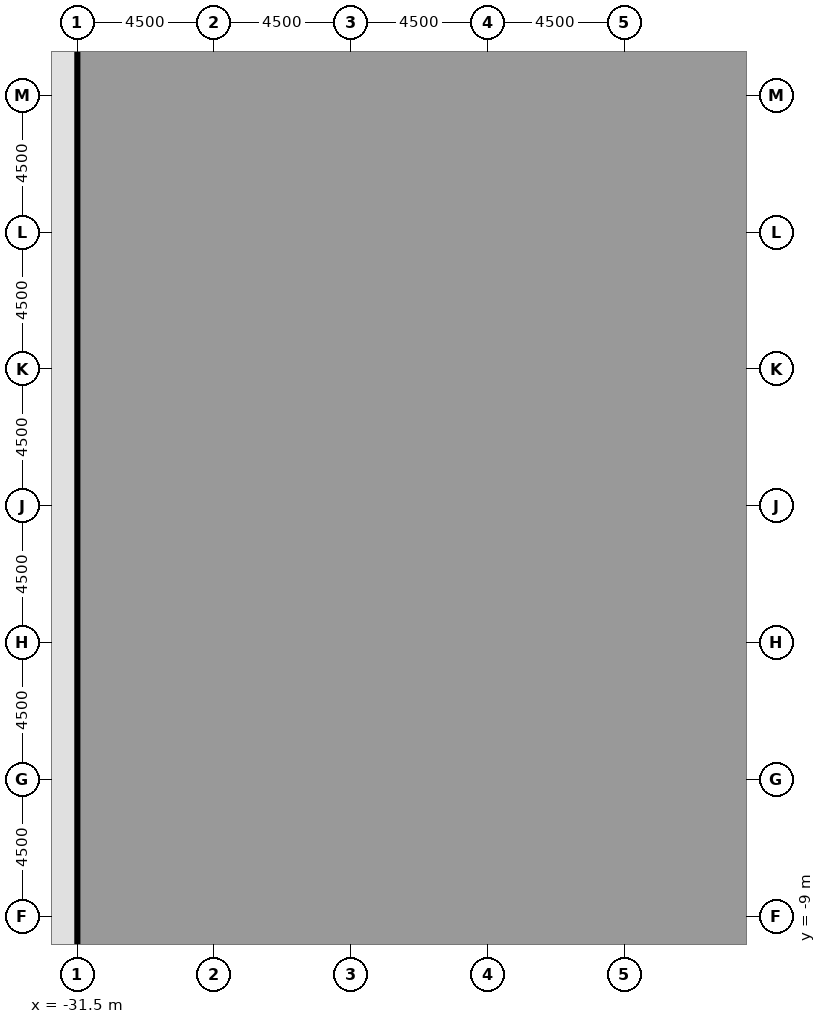
"""IFC4 building model, lengths in metres.
Left out: names, types, materials, properties, quantities, classifications, styles, units other than length and angle.
Written with IfcOpenShell. Run it as: python <this file> out.ifc"""

import sys

from ifc_helpers import new_model, si_unit, direction, frame, frame_2d, origin, origin_2d, place, context, subcontext, project, spatial, rectangle, extrude, element, fill, save


model = new_model("IFC4")
c1 = context("Model", 3, precision=1e-05, world=origin(), true_north=direction((0.0, 1.0)))
c2 = subcontext(c1, "Body", "Model", "MODEL_VIEW")
j1 = project(units=[si_unit("LENGTHUNIT", "METRE"), si_unit("PLANEANGLEUNIT", "RADIAN")], contexts=[c1])
p1 = place(None, origin())
s1 = spatial("IfcSite", under=j1, at=p1, CompositionType="ELEMENT")
p2 = place(p1, origin())
s2 = spatial("IfcBuilding", under=s1, at=p2, CompositionType="ELEMENT")
p3 = place(p2, origin())
s3 = spatial("IfcBuildingStorey", under=s2, at=p3, CompositionType="ELEMENT", Elevation=0.0)
for number, where, z_axis, x_axis in (
    (1, (-31.5, -9.0, 0.0), (0.0, 0.0, 1.0), (1.0, 0.0, 0.0)),
    (2, (-31.5, -4.5, 0.0), (0.0, 0.0, 1.0), (1.0, 0.0, 0.0)),
    (3, (-31.5, 0.0, 0.0), (0.0, 0.0, 1.0), (1.0, 0.0, 0.0)),
    (4, (-31.5, 4.5, 0.0), (0.0, 0.0, 1.0), (1.0, 0.0, 0.0)),
    (5, (-31.5, 9.0, 0.0), (0.0, 0.0, 1.0), (1.0, 0.0, 0.0)),
    (6, (-31.5, 13.5, 0.0), (0.0, 0.0, 1.0), (1.0, 0.0, 0.0)),
    (7, (-31.5, 18.0, 0.0), (0.0, 0.0, 1.0), (1.0, 0.0, 0.0)),
):
    element("IfcColumn", number, at=place(p3, frame(where, z_axis=z_axis, x_axis=x_axis)), inside=s3, PredefinedType="COLUMN", context=c2, shape_type="SweptSolid", body=[
        extrude(rectangle(XDim=1.4, YDim=1.4, at=origin_2d()), origin(), (0.0, 0.0, 1.0), 7.2),
    ])
for number, where, z_axis, x_axis in (
    (8, (-27.0, -9.0, 0.0), (0.0, 0.0, 1.0), (1.0, 0.0, 0.0)),
    (9, (-27.0, 0.0, 0.0), (0.0, 0.0, 1.0), (1.0, 0.0, 0.0)),
    (10, (-27.0, 9.0, 0.0), (0.0, 0.0, 1.0), (1.0, 0.0, 0.0)),
    (11, (-27.0, 18.0, 0.0), (0.0, 0.0, 1.0), (1.0, 0.0, 0.0)),
):
    element("IfcColumn", number, at=place(p3, frame(where, z_axis=z_axis, x_axis=x_axis)), inside=s3, PredefinedType="COLUMN", context=c2, shape_type="SweptSolid", body=[
        extrude(rectangle(XDim=1.6, YDim=1.6, at=origin_2d()), origin(), (0.0, 0.0, 1.0), 6.75),
    ])
for number, where, z_axis, x_axis in (
    (12, (-18.0, -9.0, 0.0), (0.0, 0.0, 1.0), (1.0, 0.0, 0.0)),
    (13, (-18.0, 0.0, 0.0), (0.0, 0.0, 1.0), (1.0, 0.0, 0.0)),
    (14, (-18.0, 9.0, 0.0), (0.0, 0.0, 1.0), (1.0, 0.0, 0.0)),
    (15, (-18.0, 18.0, 0.0), (0.0, 0.0, 1.0), (1.0, 0.0, 0.0)),
):
    element("IfcColumn", number, at=place(p3, frame(where, z_axis=z_axis, x_axis=x_axis)), inside=s3, PredefinedType="COLUMN", context=c2, shape_type="SweptSolid", body=[
        extrude(rectangle(XDim=1.6, YDim=1.6, at=origin_2d()), origin(), (0.0, 0.0, 1.0), 7.2),
    ])
p4 = place(p3, frame((-10.0, -9.0, 0.0), z_axis=(0.0, 0.0, 1.0), x_axis=(0.0, 1.0, 0.0)))
e16 = element("IfcWall", 16, at=p4, inside=s3, PredefinedType="SHEAR", context=c2, shape_type="SweptSolid", body=[
    extrude(rectangle(XDim=27.5, YDim=1.0, at=frame_2d((13.75, 0.0))), origin(), (0.0, 0.0, 1.0), 7.2),
])
p5 = place(p4, frame((12.55, 0.0, 0.0)))
e17 = element("IfcOpeningElement", 17, at=p5, cuts=e16, PredefinedType="OPENING", context=c2, shape_type="SweptSolid", body=[
    extrude(rectangle(XDim=2.4, YDim=2.4, at=frame_2d((1.2, 1.2))), frame((0.0, 0.51, 0.0), z_axis=(0.0, -1.0, 0.0), x_axis=(1.0, 0.0, 0.0)), (0.0, 0.0, 1.0), 1.02),
])
p6 = place(p4, frame((6.825, 0.0, 0.0)))
e18 = element("IfcOpeningElement", 18, at=p6, cuts=e16, PredefinedType="OPENING", context=c2, shape_type="SweptSolid", body=[
    extrude(rectangle(XDim=1.2, YDim=2.1, at=frame_2d((0.6, 1.05))), frame((0.0, 0.51, 0.0), z_axis=(0.0, -1.0, 0.0), x_axis=(1.0, 0.0, 0.0)), (0.0, 0.0, 1.0), 1.02),
])
p7 = place(p4, frame((19.475, 0.0, 0.0)))
e19 = element("IfcOpeningElement", 19, at=p7, cuts=e16, PredefinedType="OPENING", context=c2, shape_type="SweptSolid", body=[
    extrude(rectangle(XDim=1.2, YDim=2.1, at=frame_2d((0.6, 1.05))), frame((0.0, 0.51, 0.0), z_axis=(0.0, -1.0, 0.0), x_axis=(1.0, 0.0, 0.0)), (0.0, 0.0, 1.0), 1.02),
])
p8 = place(p3, frame((-31.5, 18.7, 0.0), z_axis=(0.0, 0.0, 1.0), x_axis=(0.0, 1.0, 0.0)))
e20 = element("IfcWall", 20, at=p8, inside=s3, PredefinedType="SOLIDWALL", context=c2, shape_type="SweptSolid", body=[
    extrude(rectangle(XDim=3.1, YDim=0.35, at=frame_2d((1.55, 0.0))), origin(), (0.0, 0.0, 1.0), 5.85),
])
p9 = place(p3, frame((-31.5, 14.2, 0.0), z_axis=(0.0, 0.0, 1.0), x_axis=(0.0, 1.0, 0.0)))
e21 = element("IfcWall", 21, at=p9, inside=s3, PredefinedType="SOLIDWALL", context=c2, shape_type="SweptSolid", body=[
    extrude(rectangle(XDim=3.1, YDim=0.35, at=frame_2d((1.55, 0.0))), origin(), (0.0, 0.0, 1.0), 5.85),
])
p10 = place(p9, frame((0.65, 0.0, 0.0)))
e22 = element("IfcOpeningElement", 22, at=p10, cuts=e21, PredefinedType="OPENING", context=c2, shape_type="SweptSolid", body=[
    extrude(rectangle(XDim=1.8, YDim=2.1, at=frame_2d((0.9, 1.05))), frame((0.0, 0.185, 0.0), z_axis=(0.0, -1.0, 0.0), x_axis=(1.0, 0.0, 0.0)), (0.0, 0.0, 1.0), 0.37),
])
for number, where, z_axis, x_axis in (
    (23, (-31.5, 9.7, 0.0), (0.0, 0.0, 1.0), (0.0, 1.0, 0.0)),
    (24, (-31.5, 5.2, 0.0), (0.0, 0.0, 1.0), (0.0, 1.0, 0.0)),
    (25, (-31.5, 0.7, 0.0), (0.0, 0.0, 1.0), (0.0, 1.0, 0.0)),
    (26, (-31.5, -3.8, 0.0), (0.0, 0.0, 1.0), (0.0, 1.0, 0.0)),
):
    element("IfcWall", number, at=place(p3, frame(where, z_axis=z_axis, x_axis=x_axis)), inside=s3, PredefinedType="SOLIDWALL", context=c2, shape_type="SweptSolid", body=[
        extrude(rectangle(XDim=3.1, YDim=0.35, at=frame_2d((1.55, 0.0))), origin(), (0.0, 0.0, 1.0), 5.85),
    ])
p11 = place(p3, frame((-31.5, -8.3, 0.0), z_axis=(0.0, 0.0, 1.0), x_axis=(0.0, 1.0, 0.0)))
e27 = element("IfcWall", 27, at=p11, inside=s3, PredefinedType="SOLIDWALL", context=c2, shape_type="SweptSolid", body=[
    extrude(rectangle(XDim=3.1, YDim=0.35, at=frame_2d((1.55, 0.0))), origin(), (0.0, 0.0, 1.0), 5.85),
])
p12 = place(p11, frame((0.2, 0.0, 0.0)))
e28 = element("IfcOpeningElement", 28, at=p12, cuts=e27, PredefinedType="OPENING", context=c2, shape_type="SweptSolid", body=[
    extrude(rectangle(XDim=1.8, YDim=2.1, at=frame_2d((0.9, 1.05))), frame((0.0, 0.185, 0.0), z_axis=(0.0, -1.0, 0.0), x_axis=(1.0, 0.0, 0.0)), (0.0, 0.0, 1.0), 0.37),
])
p13 = place(p3, frame((-31.5, -12.8, 0.0), z_axis=(0.0, 0.0, 1.0), x_axis=(0.0, 1.0, 0.0)))
e29 = element("IfcWall", 29, at=p13, inside=s3, PredefinedType="SOLIDWALL", context=c2, shape_type="SweptSolid", body=[
    extrude(rectangle(XDim=3.1, YDim=0.35, at=frame_2d((1.55, 0.0))), origin(), (0.0, 0.0, 1.0), 5.85),
])
p14 = place(p13, frame((0.95, 0.0, 0.0)))
e30 = element("IfcOpeningElement", 30, at=p14, cuts=e29, PredefinedType="OPENING", context=c2, shape_type="SweptSolid", body=[
    extrude(rectangle(XDim=1.2, YDim=2.2, at=frame_2d((0.6, 1.1))), frame((0.0, 0.185, 0.0), z_axis=(0.0, -1.0, 0.0), x_axis=(1.0, 0.0, 0.0)), (0.0, 0.0, 1.0), 0.37),
])
p15 = place(p3, frame((-22.5, -14.0, 0.0), z_axis=(0.0, 0.0, 1.0), x_axis=(0.0, 1.0, 0.0)))
e31 = element("IfcWall", 31, at=p15, inside=s3, PredefinedType="PARTITIONING", context=c2, shape_type="SweptSolid", body=[
    extrude(rectangle(XDim=5.0, YDim=0.15, at=frame_2d((2.5, 0.0))), origin(), (0.0, 0.0, 1.0), 6.75),
])
p16 = place(p15, frame((2.0, 0.0, 0.0)))
e32 = element("IfcOpeningElement", 32, at=p16, cuts=e31, PredefinedType="OPENING", context=c2, shape_type="SweptSolid", body=[
    extrude(rectangle(XDim=1.0, YDim=2.1, at=frame_2d((0.5, 1.05))), frame((0.0, 0.085, 0.0), z_axis=(0.0, -1.0, 0.0), x_axis=(1.0, 0.0, 0.0)), (0.0, 0.0, 1.0), 0.17),
])
p17 = place(p3, frame((-12.7, -9.0, 0.0), z_axis=(0.0, 0.0, 1.0), x_axis=(1.0, 0.0, 0.0)))
e33 = element("IfcWall", 33, at=p17, inside=s3, PredefinedType="PARTITIONING", context=c2, shape_type="SweptSolid", body=[
    extrude(rectangle(XDim=2.2, YDim=0.15, at=frame_2d((1.1, 0.0))), origin(), (0.0, 0.0, 1.0), 6.75),
])
p18 = place(p17, frame((0.25, 0.0, 0.0)))
e34 = element("IfcOpeningElement", 34, at=p18, cuts=e33, PredefinedType="OPENING", context=c2, shape_type="SweptSolid", body=[
    extrude(rectangle(XDim=1.7, YDim=2.1, at=frame_2d((0.85, 1.05))), frame((0.0, 0.085, 0.0), z_axis=(0.0, -1.0, 0.0), x_axis=(1.0, 0.0, 0.0)), (0.0, 0.0, 1.0), 0.17),
])
p19 = place(p3, frame((-17.15, -9.0, 0.0), z_axis=(0.0, 0.0, 1.0), x_axis=(1.0, 0.0, 0.0)))
e35 = element("IfcWall", 35, at=p19, inside=s3, PredefinedType="PARTITIONING", context=c2, shape_type="SweptSolid", body=[
    extrude(rectangle(XDim=4.45, YDim=0.15, at=frame_2d((2.225, 0.0))), origin(), (0.0, 0.0, 1.0), 6.75),
])
for number, where, z_axis, x_axis in (
    (36, (-22.5, -9.0, 0.0), (0.0, 0.0, 1.0), (1.0, 0.0, 0.0)),
    (37, (-26.15, -9.0, 0.0), (0.0, 0.0, 1.0), (1.0, 0.0, 0.0)),
):
    element("IfcWall", number, at=place(p3, frame(where, z_axis=z_axis, x_axis=x_axis)), inside=s3, PredefinedType="PARTITIONING", context=c2, shape_type="SweptSolid", body=[
        extrude(rectangle(XDim=3.65, YDim=0.15, at=frame_2d((1.825, 0.0))), origin(), (0.0, 0.0, 1.0), 6.75),
    ])
p20 = place(p3, frame((-30.75, -9.0, 0.0), z_axis=(0.0, 0.0, 1.0), x_axis=(1.0, 0.0, 0.0)))
e38 = element("IfcWall", 38, at=p20, inside=s3, PredefinedType="PARTITIONING", context=c2, shape_type="SweptSolid", body=[
    extrude(rectangle(XDim=2.9, YDim=0.15, at=frame_2d((1.45, 0.0))), origin(), (0.0, 0.0, 1.0), 6.75),
])
p21 = place(p3, frame((-12.7, -9.0, 0.0), z_axis=(0.0, 0.0, 1.0), x_axis=(0.0, 1.0, 0.0)))
e39 = element("IfcWall", 39, at=p21, inside=s3, PredefinedType="PARTITIONING", context=c2, shape_type="SweptSolid", body=[
    extrude(rectangle(XDim=3.0, YDim=0.15, at=frame_2d((1.5, 0.0))), origin(), (0.0, 0.0, 1.0), 6.75),
])
p22 = place(p21, frame((0.3, 0.0, 0.0)))
e40 = element("IfcOpeningElement", 40, at=p22, cuts=e39, PredefinedType="OPENING", context=c2, shape_type="SweptSolid", body=[
    extrude(rectangle(XDim=2.4, YDim=2.4, at=frame_2d((1.2, 1.2))), frame((0.0, 0.085, 0.0), z_axis=(0.0, -1.0, 0.0), x_axis=(1.0, 0.0, 0.0)), (0.0, 0.0, 1.0), 0.17),
])
p23 = place(p3, frame((-12.7, -6.0, 0.0), z_axis=(0.0, 0.0, 1.0), x_axis=(0.0, 1.0, 0.0)))
e41 = element("IfcWall", 41, at=p23, inside=s3, PredefinedType="PARTITIONING", context=c2, shape_type="SweptSolid", body=[
    extrude(rectangle(XDim=15.0, YDim=0.15, at=frame_2d((7.5, 0.0))), origin(), (0.0, 0.0, 1.0), 6.75),
])
p24 = place(p23, frame((7.0, 0.0, 0.0)))
e42 = element("IfcOpeningElement", 42, at=p24, cuts=e41, PredefinedType="OPENING", context=c2, shape_type="SweptSolid", body=[
    extrude(rectangle(XDim=1.0, YDim=2.1, at=frame_2d((0.5, 1.05))), frame((0.0, 0.085, 0.0), z_axis=(0.0, -1.0, 0.0), x_axis=(1.0, 0.0, 0.0)), (0.0, 0.0, 1.0), 0.17),
])
p25 = place(p3, frame((-12.7, 9.0, 0.0), z_axis=(0.0, 0.0, 1.0), x_axis=(0.0, 1.0, 0.0)))
e43 = element("IfcWall", 43, at=p25, inside=s3, PredefinedType="PARTITIONING", context=c2, shape_type="SweptSolid", body=[
    extrude(rectangle(XDim=5.6, YDim=0.15, at=frame_2d((2.8, 0.0))), origin(), (0.0, 0.0, 1.0), 6.75),
])
p26 = place(p25, frame((2.3, 0.0, 0.0)))
e44 = element("IfcOpeningElement", 44, at=p26, cuts=e43, PredefinedType="OPENING", context=c2, shape_type="SweptSolid", body=[
    extrude(rectangle(XDim=1.0, YDim=2.1, at=frame_2d((0.5, 1.05))), frame((0.0, 0.085, 0.0), z_axis=(0.0, -1.0, 0.0), x_axis=(1.0, 0.0, 0.0)), (0.0, 0.0, 1.0), 0.17),
])
p27 = place(p3, frame((-12.7, 14.6, 0.0), z_axis=(0.0, 0.0, 1.0), x_axis=(0.0, 1.0, 0.0)))
e45 = element("IfcWall", 45, at=p27, inside=s3, PredefinedType="PARTITIONING", context=c2, shape_type="SweptSolid", body=[
    extrude(rectangle(XDim=3.9, YDim=0.15, at=frame_2d((1.95, 0.0))), origin(), (0.0, 0.0, 1.0), 6.75),
])
p28 = place(p27, frame((0.75, 0.0, 0.0)))
e46 = element("IfcOpeningElement", 46, at=p28, cuts=e45, PredefinedType="OPENING", context=c2, shape_type="SweptSolid", body=[
    extrude(rectangle(XDim=2.4, YDim=2.4, at=frame_2d((1.2, 1.2))), frame((0.0, 0.085, 0.0), z_axis=(0.0, -1.0, 0.0), x_axis=(1.0, 0.0, 0.0)), (0.0, 0.0, 1.0), 0.17),
])
p29 = place(p3, frame((-12.7, 18.5, 0.0), z_axis=(0.0, 0.0, 1.0), x_axis=(1.0, 0.0, 0.0)))
e47 = element("IfcWall", 47, at=p29, inside=s3, PredefinedType="PARTITIONING", context=c2, shape_type="SweptSolid", body=[
    extrude(rectangle(XDim=2.2, YDim=0.15, at=frame_2d((1.1, 0.0))), origin(), (0.0, 0.0, 1.0), 6.75),
])
p30 = place(p29, frame((0.25, 0.0, 0.0)))
e48 = element("IfcOpeningElement", 48, at=p30, cuts=e47, PredefinedType="OPENING", context=c2, shape_type="SweptSolid", body=[
    extrude(rectangle(XDim=1.7, YDim=2.1, at=frame_2d((0.85, 1.05))), frame((0.0, 0.085, 0.0), z_axis=(0.0, -1.0, 0.0), x_axis=(1.0, 0.0, 0.0)), (0.0, 0.0, 1.0), 0.17),
])
p31 = place(p3, frame((-31.325, -6.0, 0.0), z_axis=(0.0, 0.0, 1.0), x_axis=(1.0, 0.0, 0.0)))
e49 = element("IfcWall", 49, at=p31, inside=s3, PredefinedType="PARTITIONING", context=c2, shape_type="SweptSolid", body=[
    extrude(rectangle(XDim=18.625, YDim=0.15, at=frame_2d((9.312, 0.0))), origin(), (0.0, 0.0, 1.0), 6.75),
])
p32 = place(p3, frame((-17.15, 9.0, 0.0), z_axis=(0.0, 0.0, 1.0), x_axis=(1.0, 0.0, 0.0)))
e50 = element("IfcWall", 50, at=p32, inside=s3, PredefinedType="PARTITIONING", context=c2, shape_type="SweptSolid", body=[
    extrude(rectangle(XDim=4.45, YDim=0.15, at=frame_2d((2.225, 0.0))), origin(), (0.0, 0.0, 1.0), 6.75),
])
p33 = place(p3, frame((-26.15, 9.0, 0.0), z_axis=(0.0, 0.0, 1.0), x_axis=(1.0, 0.0, 0.0)))
e51 = element("IfcWall", 51, at=p33, inside=s3, PredefinedType="PARTITIONING", context=c2, shape_type="SweptSolid", body=[
    extrude(rectangle(XDim=7.3, YDim=0.15, at=frame_2d((3.65, 0.0))), origin(), (0.0, 0.0, 1.0), 6.75),
])
p34 = place(p3, frame((-30.75, 9.0, 0.0), z_axis=(0.0, 0.0, 1.0), x_axis=(1.0, 0.0, 0.0)))
e52 = element("IfcWall", 52, at=p34, inside=s3, PredefinedType="PARTITIONING", context=c2, shape_type="SweptSolid", body=[
    extrude(rectangle(XDim=2.9, YDim=0.15, at=frame_2d((1.45, 0.0))), origin(), (0.0, 0.0, 1.0), 6.75),
])
p35 = place(p3, frame((-31.325, 14.6, 0.0), z_axis=(0.0, 0.0, 1.0), x_axis=(1.0, 0.0, 0.0)))
e53 = element("IfcWall", 53, at=p35, inside=s3, PredefinedType="PARTITIONING", context=c2, shape_type="SweptSolid", body=[
    extrude(rectangle(XDim=18.625, YDim=0.15, at=frame_2d((9.312, 0.0))), origin(), (0.0, 0.0, 1.0), 6.75),
])
p36 = place(p3, frame((-17.15, 18.5, 0.0), z_axis=(0.0, 0.0, 1.0), x_axis=(1.0, 0.0, 0.0)))
e54 = element("IfcWall", 54, at=p36, inside=s3, PredefinedType="PARTITIONING", context=c2, shape_type="SweptSolid", body=[
    extrude(rectangle(XDim=4.45, YDim=0.15, at=frame_2d((2.225, 0.0))), origin(), (0.0, 0.0, 1.0), 6.75),
])
p37 = place(p3, frame((-26.15, 18.5, 0.0), z_axis=(0.0, 0.0, 1.0), x_axis=(1.0, 0.0, 0.0)))
e55 = element("IfcWall", 55, at=p37, inside=s3, PredefinedType="PARTITIONING", context=c2, shape_type="SweptSolid", body=[
    extrude(rectangle(XDim=7.3, YDim=0.15, at=frame_2d((3.65, 0.0))), origin(), (0.0, 0.0, 1.0), 6.75),
])
p38 = place(p3, frame((-30.75, 18.5, 0.0), z_axis=(0.0, 0.0, 1.0), x_axis=(1.0, 0.0, 0.0)))
e56 = element("IfcWall", 56, at=p38, inside=s3, PredefinedType="PARTITIONING", context=c2, shape_type="SweptSolid", body=[
    extrude(rectangle(XDim=2.9, YDim=0.15, at=frame_2d((1.45, 0.0))), origin(), (0.0, 0.0, 1.0), 6.75),
])
p39 = place(p10, origin())
e57 = element("IfcDoor", 57, at=p39, inside=s3, OperationType="DOUBLE_DOOR_DOUBLE_SWING", PredefinedType="DOOR", context=c2, shape_type="SweptSolid", body=[
    extrude(rectangle(XDim=1.8, YDim=2.1, at=frame_2d((0.9, 1.05))), frame((0.0, 0.025, 0.0), z_axis=(0.0, -1.0, 0.0), x_axis=(1.0, 0.0, 0.0)), (0.0, 0.0, 1.0), 0.05),
])
fill(e22, e57)
p40 = place(p5, origin())
e58 = element("IfcDoor", 58, at=p40, inside=s3, OperationType="DOUBLE_DOOR_DOUBLE_SWING", PredefinedType="DOOR", context=c2, shape_type="SweptSolid", body=[
    extrude(rectangle(XDim=2.4, YDim=2.4, at=frame_2d((1.2, 1.2))), frame((0.0, 0.025, 0.0), z_axis=(0.0, -1.0, 0.0), x_axis=(1.0, 0.0, 0.0)), (0.0, 0.0, 1.0), 0.05),
])
fill(e17, e58)
p41 = place(p6, origin())
e59 = element("IfcDoor", 59, at=p41, inside=s3, OperationType="SINGLE_SWING_LEFT", PredefinedType="DOOR", context=c2, shape_type="SweptSolid", body=[
    extrude(rectangle(XDim=1.2, YDim=2.1, at=frame_2d((0.6, 1.05))), frame((0.0, 0.025, 0.0), z_axis=(0.0, -1.0, 0.0), x_axis=(1.0, 0.0, 0.0)), (0.0, 0.0, 1.0), 0.05),
])
fill(e18, e59)
p42 = place(p7, origin())
e60 = element("IfcDoor", 60, at=p42, inside=s3, OperationType="SINGLE_SWING_LEFT", PredefinedType="DOOR", context=c2, shape_type="SweptSolid", body=[
    extrude(rectangle(XDim=1.2, YDim=2.1, at=frame_2d((0.6, 1.05))), frame((0.0, 0.025, 0.0), z_axis=(0.0, -1.0, 0.0), x_axis=(1.0, 0.0, 0.0)), (0.0, 0.0, 1.0), 0.05),
])
fill(e19, e60)
p43 = place(p24, origin())
e61 = element("IfcDoor", 61, at=p43, inside=s3, OperationType="SINGLE_SWING_LEFT", PredefinedType="DOOR", context=c2, shape_type="SweptSolid", body=[
    extrude(rectangle(XDim=1.0, YDim=2.1, at=frame_2d((0.5, 1.05))), frame((0.0, 0.025, 0.0), z_axis=(0.0, -1.0, 0.0), x_axis=(1.0, 0.0, 0.0)), (0.0, 0.0, 1.0), 0.05),
])
fill(e42, e61)
p44 = place(p26, origin())
e62 = element("IfcDoor", 62, at=p44, inside=s3, OperationType="SINGLE_SWING_RIGHT", PredefinedType="DOOR", context=c2, shape_type="SweptSolid", body=[
    extrude(rectangle(XDim=1.0, YDim=2.1, at=frame_2d((0.5, 1.05))), frame((0.0, 0.025, 0.0), z_axis=(0.0, -1.0, 0.0), x_axis=(1.0, 0.0, 0.0)), (0.0, 0.0, 1.0), 0.05),
])
fill(e44, e62)
p45 = place(p18, origin())
e63 = element("IfcDoor", 63, at=p45, inside=s3, OperationType="DOUBLE_DOOR_DOUBLE_SWING", PredefinedType="DOOR", context=c2, shape_type="SweptSolid", body=[
    extrude(rectangle(XDim=1.7, YDim=2.1, at=frame_2d((0.85, 1.05))), frame((0.0, 0.025, 0.0), z_axis=(0.0, -1.0, 0.0), x_axis=(1.0, 0.0, 0.0)), (0.0, 0.0, 1.0), 0.05),
])
fill(e34, e63)
p46 = place(p22, origin())
e64 = element("IfcDoor", 64, at=p46, inside=s3, OperationType="DOUBLE_DOOR_DOUBLE_SWING", PredefinedType="DOOR", context=c2, shape_type="SweptSolid", body=[
    extrude(rectangle(XDim=2.4, YDim=2.4, at=frame_2d((1.2, 1.2))), frame((0.0, 0.025, 0.0), z_axis=(0.0, -1.0, 0.0), x_axis=(1.0, 0.0, 0.0)), (0.0, 0.0, 1.0), 0.05),
])
fill(e40, e64)
p47 = place(p28, origin())
e65 = element("IfcDoor", 65, at=p47, inside=s3, OperationType="DOUBLE_DOOR_DOUBLE_SWING", PredefinedType="DOOR", context=c2, shape_type="SweptSolid", body=[
    extrude(rectangle(XDim=2.4, YDim=2.4, at=frame_2d((1.2, 1.2))), frame((0.0, 0.025, 0.0), z_axis=(0.0, -1.0, 0.0), x_axis=(1.0, 0.0, 0.0)), (0.0, 0.0, 1.0), 0.05),
])
fill(e46, e65)
p48 = place(p30, origin())
e66 = element("IfcDoor", 66, at=p48, inside=s3, OperationType="DOUBLE_DOOR_DOUBLE_SWING", PredefinedType="DOOR", context=c2, shape_type="SweptSolid", body=[
    extrude(rectangle(XDim=1.7, YDim=2.1, at=frame_2d((0.85, 1.05))), frame((0.0, 0.025, 0.0), z_axis=(0.0, -1.0, 0.0), x_axis=(1.0, 0.0, 0.0)), (0.0, 0.0, 1.0), 0.05),
])
fill(e48, e66)
p49 = place(p12, origin())
e67 = element("IfcDoor", 67, at=p49, inside=s3, OperationType="DOUBLE_DOOR_DOUBLE_SWING", PredefinedType="DOOR", context=c2, shape_type="SweptSolid", body=[
    extrude(rectangle(XDim=1.8, YDim=2.1, at=frame_2d((0.9, 1.05))), frame((0.0, 0.025, 0.0), z_axis=(0.0, -1.0, 0.0), x_axis=(1.0, 0.0, 0.0)), (0.0, 0.0, 1.0), 0.05),
])
fill(e28, e67)
save(model, sys.argv[1])
